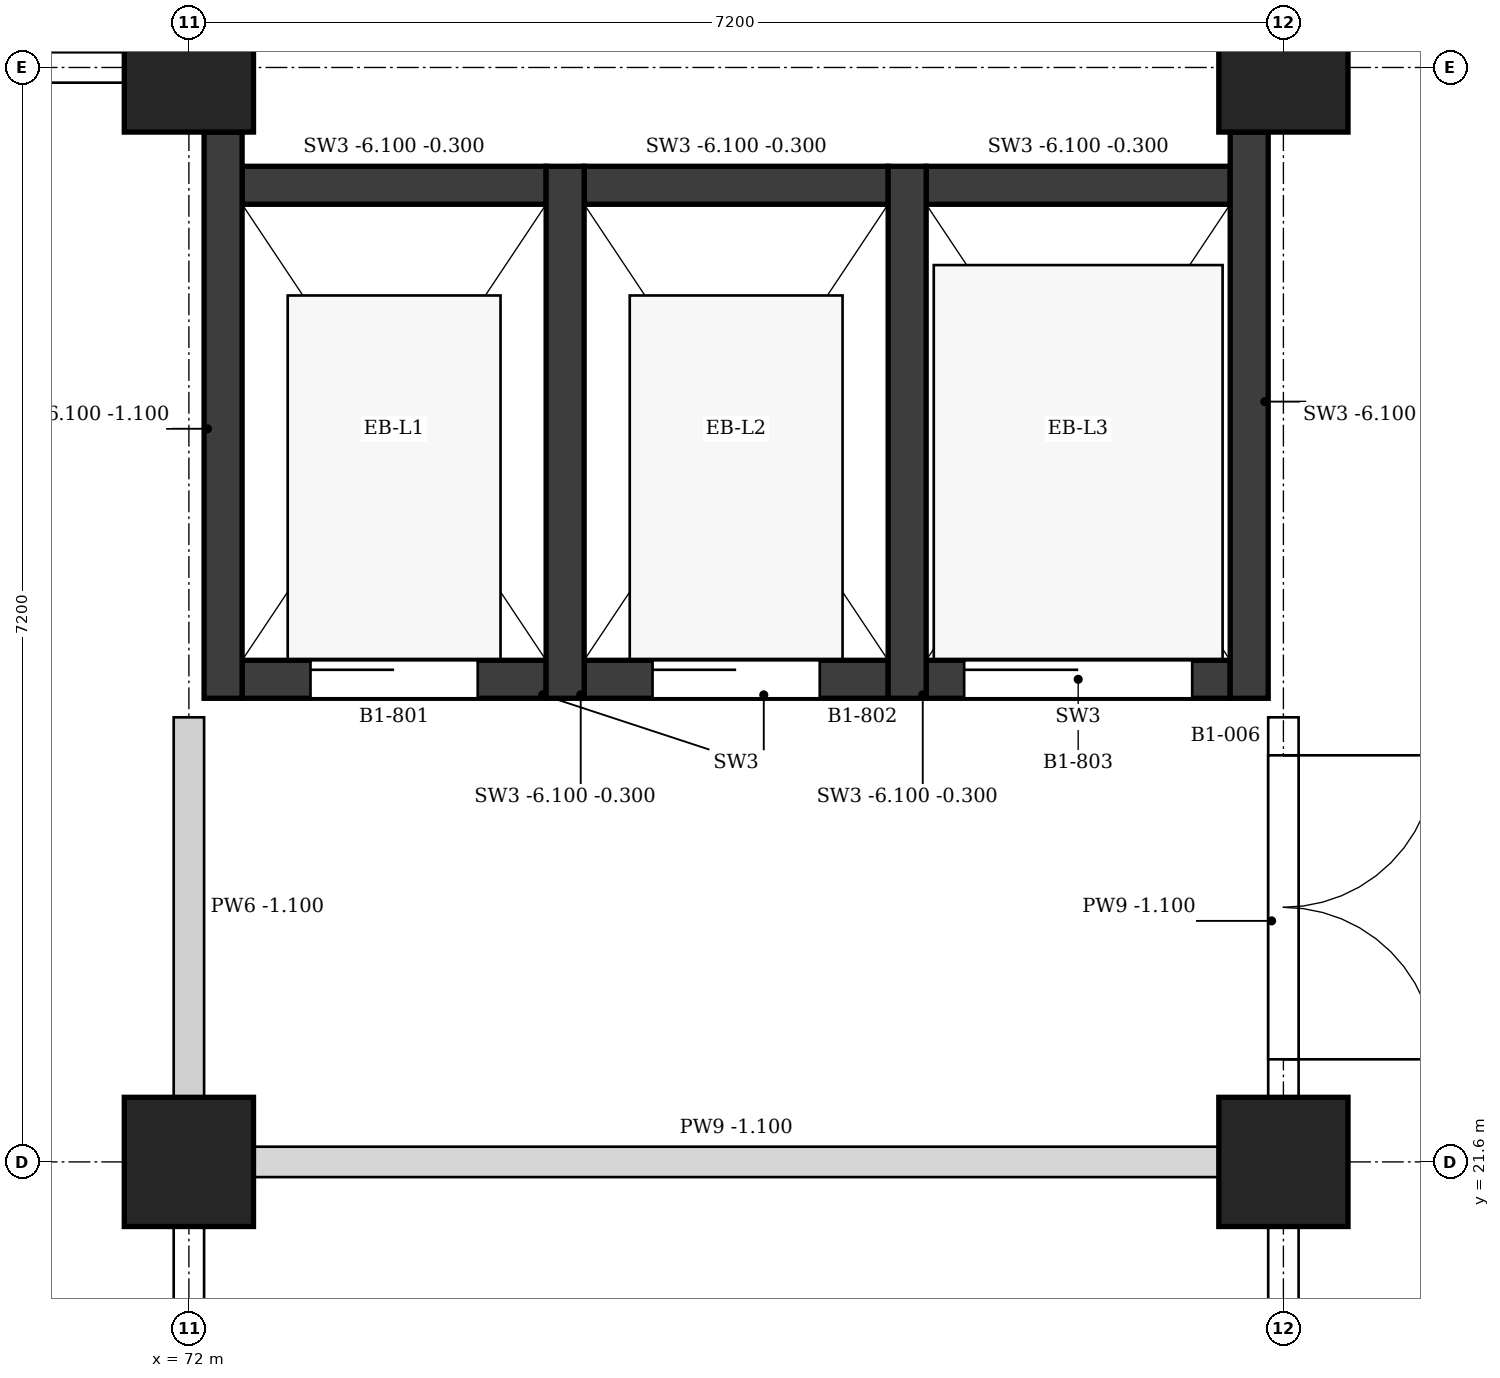
"""IFC4 building model, lengths in metres.
Left out: names, types, materials, properties, quantities, classifications, styles, units other than length and angle.
Written with IfcOpenShell. Run it as: python <this file> out.ifc"""

import sys

from ifc_helpers import new_model, si_unit, direction, frame, frame_2d, origin, origin_2d, place, context, subcontext, project, spatial, rectangle, extrude, element, fill, save


model = new_model("IFC4")
c1 = context("Model", 3, precision=1e-05, world=origin(), true_north=direction((0.0, 1.0)))
c2 = subcontext(c1, "Body", "Model", "MODEL_VIEW")
j1 = project(units=[si_unit("LENGTHUNIT", "METRE"), si_unit("PLANEANGLEUNIT", "RADIAN")], contexts=[c1])
p1 = place(None, origin())
s1 = spatial("IfcSite", under=j1, at=p1, CompositionType="ELEMENT")
p2 = place(p1, origin())
s2 = spatial("IfcBuilding", under=s1, at=p2, CompositionType="ELEMENT")
p3 = place(p2, frame((0.0, 0.0, -4.5)))
s3 = spatial("IfcBuildingStorey", under=s2, at=p3, CompositionType="ELEMENT", Elevation=-4.5)
for number, where, z_axis, x_axis in (
    (1, (72.0, 21.6, 0.0), (0.0, 0.0, 1.0), (1.0, 0.0, 0.0)),
    (2, (72.0, 28.8, 0.0), (0.0, 0.0, 1.0), (1.0, 0.0, 0.0)),
    (3, (79.2, 21.6, 0.0), (0.0, 0.0, 1.0), (1.0, 0.0, 0.0)),
    (4, (79.2, 28.8, 0.0), (0.0, 0.0, 1.0), (1.0, 0.0, 0.0)),
):
    element("IfcColumn", number, at=place(p3, frame(where, z_axis=z_axis, x_axis=x_axis)), inside=s3, PredefinedType="COLUMN", context=c2, shape_type="SweptSolid", body=[
        extrude(rectangle(XDim=0.85, YDim=0.85, at=origin_2d()), origin(), (0.0, 0.0, 1.0), 4.5),
    ])
p4 = place(p3, frame((72.225, 24.65, -1.6), z_axis=(0.0, 0.0, 1.0), x_axis=(0.0, 1.0, 0.0)))
e5 = element("IfcWall", 5, at=p4, inside=s3, PredefinedType="SHEAR", context=c2, shape_type="SweptSolid", body=[
    extrude(rectangle(XDim=3.725, YDim=0.25, at=frame_2d((1.863, 0.0))), origin(), (0.0, 0.0, 1.0), 5.0),
])
for number, where, z_axis, x_axis in (
    (6, (74.475, 24.65, -1.6), (0.0, 0.0, 1.0), (0.0, 1.0, 0.0)),
    (7, (76.725, 24.65, -1.6), (0.0, 0.0, 1.0), (0.0, 1.0, 0.0)),
):
    element("IfcWall", number, at=place(p3, frame(where, z_axis=z_axis, x_axis=x_axis)), inside=s3, PredefinedType="SHEAR", context=c2, shape_type="SweptSolid", body=[
        extrude(rectangle(XDim=3.5, YDim=0.25, at=frame_2d((1.75, 0.0))), origin(), (0.0, 0.0, 1.0), 5.8),
    ])
p5 = place(p3, frame((78.975, 24.65, -1.6), z_axis=(0.0, 0.0, 1.0), x_axis=(0.0, 1.0, 0.0)))
e8 = element("IfcWall", 8, at=p5, inside=s3, PredefinedType="SHEAR", context=c2, shape_type="SweptSolid", body=[
    extrude(rectangle(XDim=3.725, YDim=0.25, at=frame_2d((1.863, 0.0))), origin(), (0.0, 0.0, 1.0), 5.0),
])
p6 = place(p3, frame((72.35, 24.775, 0.0), z_axis=(0.0, 0.0, 1.0), x_axis=(1.0, 0.0, 0.0)))
e9 = element("IfcWall", 9, at=p6, inside=s3, PredefinedType="SHEAR", context=c2, shape_type="SweptSolid", body=[
    extrude(rectangle(XDim=2.0, YDim=0.25, at=frame_2d((1.0, 0.0))), origin(), (0.0, 0.0, 1.0), 4.2),
])
p7 = place(p6, frame((0.45, 0.0, 0.0)))
e10 = element("IfcOpeningElement", 10, at=p7, cuts=e9, PredefinedType="OPENING", context=c2, shape_type="SweptSolid", body=[
    extrude(rectangle(XDim=1.1, YDim=2.1, at=frame_2d((0.55, 1.05))), frame((0.0, 0.135, 0.0), z_axis=(0.0, -1.0, 0.0), x_axis=(1.0, 0.0, 0.0)), (0.0, 0.0, 1.0), 0.27),
])
p8 = place(p3, frame((72.35, 28.025, -1.6), z_axis=(0.0, 0.0, 1.0), x_axis=(1.0, 0.0, 0.0)))
e11 = element("IfcWall", 11, at=p8, inside=s3, PredefinedType="SHEAR", context=c2, shape_type="SweptSolid", body=[
    extrude(rectangle(XDim=2.0, YDim=0.25, at=frame_2d((1.0, 0.0))), origin(), (0.0, 0.0, 1.0), 5.8),
])
p9 = place(p3, frame((74.6, 24.775, 0.0), z_axis=(0.0, 0.0, 1.0), x_axis=(1.0, 0.0, 0.0)))
e12 = element("IfcWall", 12, at=p9, inside=s3, PredefinedType="SHEAR", context=c2, shape_type="SweptSolid", body=[
    extrude(rectangle(XDim=2.0, YDim=0.25, at=frame_2d((1.0, 0.0))), origin(), (0.0, 0.0, 1.0), 4.2),
])
p10 = place(p9, frame((0.45, 0.0, 0.0)))
e13 = element("IfcOpeningElement", 13, at=p10, cuts=e12, PredefinedType="OPENING", context=c2, shape_type="SweptSolid", body=[
    extrude(rectangle(XDim=1.1, YDim=2.1, at=frame_2d((0.55, 1.05))), frame((0.0, 0.135, 0.0), z_axis=(0.0, -1.0, 0.0), x_axis=(1.0, 0.0, 0.0)), (0.0, 0.0, 1.0), 0.27),
])
p11 = place(p3, frame((74.6, 28.025, -1.6), z_axis=(0.0, 0.0, 1.0), x_axis=(1.0, 0.0, 0.0)))
e14 = element("IfcWall", 14, at=p11, inside=s3, PredefinedType="SHEAR", context=c2, shape_type="SweptSolid", body=[
    extrude(rectangle(XDim=2.0, YDim=0.25, at=frame_2d((1.0, 0.0))), origin(), (0.0, 0.0, 1.0), 5.8),
])
p12 = place(p3, frame((76.85, 24.775, 0.0), z_axis=(0.0, 0.0, 1.0), x_axis=(1.0, 0.0, 0.0)))
e15 = element("IfcWall", 15, at=p12, inside=s3, PredefinedType="SHEAR", context=c2, shape_type="SweptSolid", body=[
    extrude(rectangle(XDim=2.0, YDim=0.25, at=frame_2d((1.0, 0.0))), origin(), (0.0, 0.0, 1.0), 4.2),
])
p13 = place(p12, frame((0.25, 0.0, 0.0)))
e16 = element("IfcOpeningElement", 16, at=p13, cuts=e15, PredefinedType="OPENING", context=c2, shape_type="SweptSolid", body=[
    extrude(rectangle(XDim=1.5, YDim=2.1, at=frame_2d((0.75, 1.05))), frame((0.0, 0.135, 0.0), z_axis=(0.0, -1.0, 0.0), x_axis=(1.0, 0.0, 0.0)), (0.0, 0.0, 1.0), 0.27),
])
p14 = place(p3, frame((76.85, 28.025, -1.6), z_axis=(0.0, 0.0, 1.0), x_axis=(1.0, 0.0, 0.0)))
e17 = element("IfcWall", 17, at=p14, inside=s3, PredefinedType="SHEAR", context=c2, shape_type="SweptSolid", body=[
    extrude(rectangle(XDim=2.0, YDim=0.25, at=frame_2d((1.0, 0.0))), origin(), (0.0, 0.0, 1.0), 5.8),
])
for number, where, z_axis, x_axis in (
    (18, (72.425, 21.6, 0.0), (0.0, 0.0, 1.0), (1.0, 0.0, 0.0)),
    (19, (65.225, 28.8, 0.0), (0.0, 0.0, 1.0), (1.0, 0.0, 0.0)),
):
    element("IfcWall", number, at=place(p3, frame(where, z_axis=z_axis, x_axis=x_axis)), inside=s3, PredefinedType="PARTITIONING", context=c2, shape_type="SweptSolid", body=[
        extrude(rectangle(XDim=6.35, YDim=0.2, at=frame_2d((3.175, 0.0))), origin(), (0.0, 0.0, 1.0), 3.4),
    ])
p15 = place(p3, frame((72.0, 14.825, 0.0), z_axis=(0.0, 0.0, 1.0), x_axis=(0.0, 1.0, 0.0)))
e20 = element("IfcWall", 20, at=p15, inside=s3, PredefinedType="PARTITIONING", context=c2, shape_type="SweptSolid", body=[
    extrude(rectangle(XDim=6.35, YDim=0.2, at=frame_2d((3.175, 0.0))), origin(), (0.0, 0.0, 1.0), 3.4),
])
p16 = place(p3, frame((72.0, 22.025, 0.0), z_axis=(0.0, 0.0, 1.0), x_axis=(0.0, 1.0, 0.0)))
e21 = element("IfcWall", 21, at=p16, inside=s3, PredefinedType="PARTITIONING", context=c2, shape_type="SweptSolid", body=[
    extrude(rectangle(XDim=2.5, YDim=0.2, at=frame_2d((1.25, 0.0))), origin(), (0.0, 0.0, 1.0), 3.4),
])
p17 = place(p3, frame((79.2, 14.825, 0.0), z_axis=(0.0, 0.0, 1.0), x_axis=(0.0, 1.0, 0.0)))
e22 = element("IfcWall", 22, at=p17, inside=s3, PredefinedType="PARTITIONING", context=c2, shape_type="SweptSolid", body=[
    extrude(rectangle(XDim=6.35, YDim=0.2, at=frame_2d((3.175, 0.0))), origin(), (0.0, 0.0, 1.0), 3.4),
])
p18 = place(p17, frame((2.675, 0.0, 0.0)))
e23 = element("IfcOpeningElement", 23, at=p18, cuts=e22, PredefinedType="OPENING", context=c2, shape_type="SweptSolid", body=[
    extrude(rectangle(XDim=1.0, YDim=2.1, at=frame_2d((0.5, 1.05))), frame((0.0, 0.11, 0.0), z_axis=(0.0, -1.0, 0.0), x_axis=(1.0, 0.0, 0.0)), (0.0, 0.0, 1.0), 0.22),
])
p19 = place(p3, frame((79.2, 22.025, 0.0), z_axis=(0.0, 0.0, 1.0), x_axis=(0.0, 1.0, 0.0)))
e24 = element("IfcWall", 24, at=p19, inside=s3, PredefinedType="PARTITIONING", context=c2, shape_type="SweptSolid", body=[
    extrude(rectangle(XDim=2.5, YDim=0.2, at=frame_2d((1.25, 0.0))), origin(), (0.0, 0.0, 1.0), 3.4),
])
p20 = place(p19, frame((0.25, 0.0, 0.0)))
e25 = element("IfcOpeningElement", 25, at=p20, cuts=e24, PredefinedType="OPENING", context=c2, shape_type="SweptSolid", body=[
    extrude(rectangle(XDim=2.0, YDim=2.4, at=frame_2d((1.0, 1.2))), frame((0.0, 0.11, 0.0), z_axis=(0.0, -1.0, 0.0), x_axis=(1.0, 0.0, 0.0)), (0.0, 0.0, 1.0), 0.22),
])
p21 = place(p7, origin())
e26 = element("IfcDoor", 26, at=p21, inside=s3, OperationType="SLIDING_TO_LEFT", PredefinedType="DOOR", context=c2, shape_type="SweptSolid", body=[
    extrude(rectangle(XDim=1.1, YDim=2.1, at=frame_2d((0.55, 1.05))), frame((0.0, 0.025, 0.0), z_axis=(0.0, -1.0, 0.0), x_axis=(1.0, 0.0, 0.0)), (0.0, 0.0, 1.0), 0.05),
])
fill(e10, e26)
p22 = place(p10, origin())
e27 = element("IfcDoor", 27, at=p22, inside=s3, OperationType="SLIDING_TO_LEFT", PredefinedType="DOOR", context=c2, shape_type="SweptSolid", body=[
    extrude(rectangle(XDim=1.1, YDim=2.1, at=frame_2d((0.55, 1.05))), frame((0.0, 0.025, 0.0), z_axis=(0.0, -1.0, 0.0), x_axis=(1.0, 0.0, 0.0)), (0.0, 0.0, 1.0), 0.05),
])
fill(e13, e27)
p23 = place(p13, origin())
e28 = element("IfcDoor", 28, at=p23, inside=s3, OperationType="SLIDING_TO_LEFT", PredefinedType="DOOR", context=c2, shape_type="SweptSolid", body=[
    extrude(rectangle(XDim=1.5, YDim=2.1, at=frame_2d((0.75, 1.05))), frame((0.0, 0.025, 0.0), z_axis=(0.0, -1.0, 0.0), x_axis=(1.0, 0.0, 0.0)), (0.0, 0.0, 1.0), 0.05),
])
fill(e16, e28)
p24 = place(p20, origin())
e29 = element("IfcDoor", 29, at=p24, inside=s3, OperationType="DOUBLE_DOOR_SINGLE_SWING", PredefinedType="DOOR", context=c2, shape_type="SweptSolid", body=[
    extrude(rectangle(XDim=2.0, YDim=2.4, at=frame_2d((1.0, 1.2))), frame((0.0, 0.025, 0.0), z_axis=(0.0, -1.0, 0.0), x_axis=(1.0, 0.0, 0.0)), (0.0, 0.0, 1.0), 0.05),
])
fill(e25, e29)
save(model, sys.argv[1])
